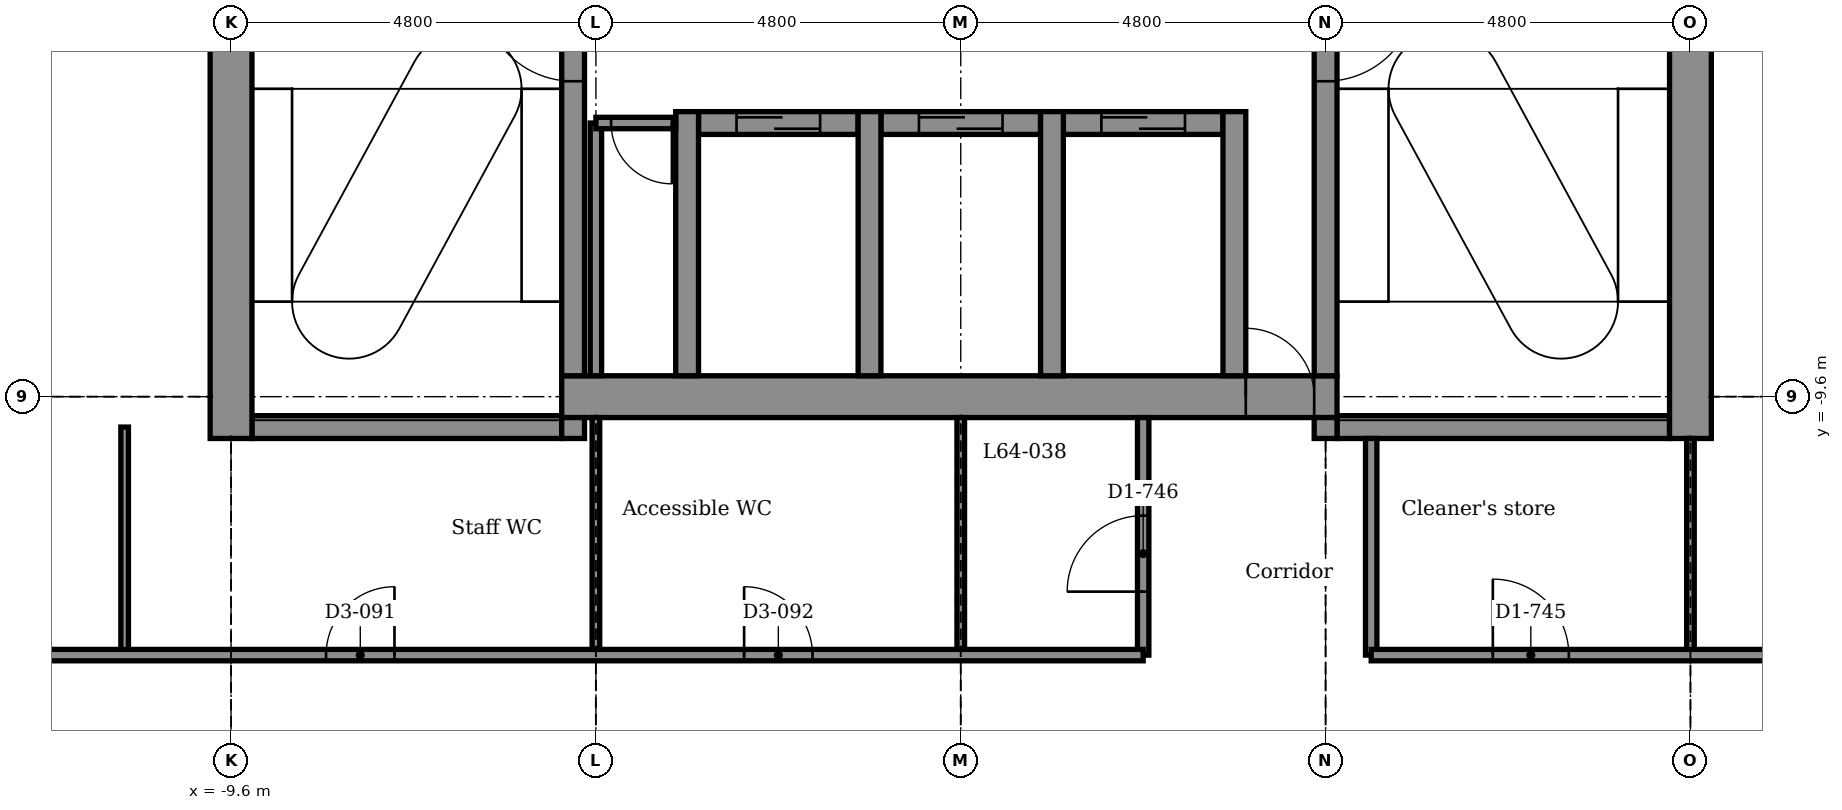
"""IFC4 building model, lengths in metres.
Left out: names, types, materials, properties, quantities, classifications, styles, units other than length and angle.
Written with IfcOpenShell. Run it as: python <this file> out.ifc"""

import sys

from ifc_helpers import new_model, si_unit, direction, frame, frame_2d, origin, place, context, subcontext, project, spatial, rectangle, extrude, element, fill, save


model = new_model("IFC4")
c1 = context("Model", 3, precision=1e-05, world=origin(), true_north=direction((0.0, 1.0)))
c2 = subcontext(c1, "Body", "Model", "MODEL_VIEW")
j1 = project(units=[si_unit("LENGTHUNIT", "METRE"), si_unit("PLANEANGLEUNIT", "RADIAN")], contexts=[c1])
p1 = place(None, origin())
s1 = spatial("IfcSite", under=j1, at=p1, CompositionType="ELEMENT")
p2 = place(p1, origin())
s2 = spatial("IfcBuilding", under=s1, at=p2, CompositionType="ELEMENT")
p3 = place(p2, frame((0.0, 0.0, 285.2)))
s3 = spatial("IfcBuildingStorey", under=s2, at=p3, CompositionType="ELEMENT", Elevation=285.2)
p4 = place(p3, frame((-9.325, -10.0, -0.15), z_axis=(0.0, 0.0, 1.0), x_axis=(1.0, 0.0, 0.0)))
e1 = element("IfcWall", 1, at=p4, inside=s3, PredefinedType="STANDARD", context=c2, shape_type="SweptSolid", body=[
    extrude(rectangle(XDim=4.075, YDim=0.3, at=frame_2d((2.038, 0.0))), origin(), (0.0, 0.0, 1.0), 3.9),
])
p5 = place(p3, frame((4.95, -10.0, -0.15), z_axis=(0.0, 0.0, 1.0), x_axis=(1.0, 0.0, 0.0)))
e2 = element("IfcWall", 2, at=p5, inside=s3, PredefinedType="STANDARD", context=c2, shape_type="SweptSolid", body=[
    extrude(rectangle(XDim=4.375, YDim=0.3, at=frame_2d((2.188, 0.0))), origin(), (0.0, 0.0, 1.0), 3.9),
])
p6 = place(p3, frame((-5.25, -9.6, -0.15), z_axis=(0.0, 0.0, 1.0), x_axis=(1.0, 0.0, 0.0)))
e3 = element("IfcWall", 3, at=p6, inside=s3, PredefinedType="SHEAR", context=c2, shape_type="SweptSolid", body=[
    extrude(rectangle(XDim=10.2, YDim=0.55, at=frame_2d((5.1, 0.0))), origin(), (0.0, 0.0, 1.0), 3.9),
])
p7 = place(p6, frame((9.0, 0.0, 0.15)))
e4 = element("IfcOpeningElement", 4, at=p7, cuts=e3, PredefinedType="OPENING", context=c2, shape_type="SweptSolid", body=[
    extrude(rectangle(XDim=0.9, YDim=2.1, at=frame_2d((0.45, 1.05))), frame((0.0, 0.285, 0.0), z_axis=(0.0, -1.0, 0.0), x_axis=(1.0, 0.0, 0.0)), (0.0, 0.0, 1.0), 0.57),
])
p8 = place(p3, frame((-3.45, -6.0, -0.15), z_axis=(0.0, 0.0, 1.0), x_axis=(1.0, 0.0, 0.0)))
e5 = element("IfcWall", 5, at=p8, inside=s3, PredefinedType="STANDARD", context=c2, shape_type="SweptSolid", body=[
    extrude(rectangle(XDim=2.1, YDim=0.3, at=frame_2d((1.05, 0.0))), origin(), (0.0, 0.0, 1.0), 3.9),
])
p9 = place(p8, frame((0.5, 0.0, 0.15)))
e6 = element("IfcOpeningElement", 6, at=p9, cuts=e5, PredefinedType="OPENING", context=c2, shape_type="SweptSolid", body=[
    extrude(rectangle(XDim=1.1, YDim=2.1, at=frame_2d((0.55, 1.05))), frame((0.0, 0.16, 0.0), z_axis=(0.0, -1.0, 0.0), x_axis=(1.0, 0.0, 0.0)), (0.0, 0.0, 1.0), 0.32),
])
p10 = place(p3, frame((-1.05, -6.0, -0.15), z_axis=(0.0, 0.0, 1.0), x_axis=(1.0, 0.0, 0.0)))
e7 = element("IfcWall", 7, at=p10, inside=s3, PredefinedType="STANDARD", context=c2, shape_type="SweptSolid", body=[
    extrude(rectangle(XDim=2.1, YDim=0.3, at=frame_2d((1.05, 0.0))), origin(), (0.0, 0.0, 1.0), 3.9),
])
p11 = place(p10, frame((0.5, 0.0, 0.15)))
e8 = element("IfcOpeningElement", 8, at=p11, cuts=e7, PredefinedType="OPENING", context=c2, shape_type="SweptSolid", body=[
    extrude(rectangle(XDim=1.1, YDim=2.1, at=frame_2d((0.55, 1.05))), frame((0.0, 0.16, 0.0), z_axis=(0.0, -1.0, 0.0), x_axis=(1.0, 0.0, 0.0)), (0.0, 0.0, 1.0), 0.32),
])
p12 = place(p3, frame((1.35, -6.0, -0.15), z_axis=(0.0, 0.0, 1.0), x_axis=(1.0, 0.0, 0.0)))
e9 = element("IfcWall", 9, at=p12, inside=s3, PredefinedType="STANDARD", context=c2, shape_type="SweptSolid", body=[
    extrude(rectangle(XDim=2.1, YDim=0.3, at=frame_2d((1.05, 0.0))), origin(), (0.0, 0.0, 1.0), 3.9),
])
p13 = place(p12, frame((0.5, 0.0, 0.15)))
e10 = element("IfcOpeningElement", 10, at=p13, cuts=e9, PredefinedType="OPENING", context=c2, shape_type="SweptSolid", body=[
    extrude(rectangle(XDim=1.1, YDim=2.1, at=frame_2d((0.55, 1.05))), frame((0.0, 0.16, 0.0), z_axis=(0.0, -1.0, 0.0), x_axis=(1.0, 0.0, 0.0)), (0.0, 0.0, 1.0), 0.32),
])
p14 = place(p3, frame((-9.6, -10.15, -0.15), z_axis=(0.0, 0.0, 1.0), x_axis=(0.0, 1.0, 0.0)))
e11 = element("IfcWall", 11, at=p14, inside=s3, PredefinedType="SHEAR", context=c2, shape_type="SweptSolid", body=[
    extrude(rectangle(XDim=7.6, YDim=0.55, at=frame_2d((3.8, 0.0))), origin(), (0.0, 0.0, 1.0), 3.9),
])
p15 = place(p3, frame((-5.1, -10.15, -0.15), z_axis=(0.0, 0.0, 1.0), x_axis=(0.0, 1.0, 0.0)))
e12 = element("IfcWall", 12, at=p15, inside=s3, PredefinedType="STANDARD", context=c2, shape_type="SweptSolid", body=[
    extrude(rectangle(XDim=0.275, YDim=0.3, at=frame_2d((0.137, 0.0))), origin(), (0.0, 0.0, 1.0), 3.9),
])
p16 = place(p3, frame((-5.1, -9.325, -0.15), z_axis=(0.0, 0.0, 1.0), x_axis=(0.0, 1.0, 0.0)))
e13 = element("IfcWall", 13, at=p16, inside=s3, PredefinedType="STANDARD", context=c2, shape_type="SweptSolid", body=[
    extrude(rectangle(XDim=7.075, YDim=0.3, at=frame_2d((3.538, 0.0))), origin(), (0.0, 0.0, 1.0), 3.9),
])
p17 = place(p16, frame((3.875, 0.0, 0.15)))
e14 = element("IfcOpeningElement", 14, at=p17, cuts=e13, PredefinedType="OPENING", context=c2, shape_type="SweptSolid", body=[
    extrude(rectangle(XDim=1.2, YDim=2.1, at=frame_2d((0.6, 1.05))), frame((0.0, 0.16, 0.0), z_axis=(0.0, -1.0, 0.0), x_axis=(1.0, 0.0, 0.0)), (0.0, 0.0, 1.0), 0.32),
])
for number, where, z_axis, x_axis in (
    (15, (-3.6, -9.325, -0.15), (0.0, 0.0, 1.0), (0.0, 1.0, 0.0)),
    (16, (-1.2, -9.325, -0.15), (0.0, 0.0, 1.0), (0.0, 1.0, 0.0)),
    (17, (1.2, -9.325, -0.15), (0.0, 0.0, 1.0), (0.0, 1.0, 0.0)),
    (18, (3.6, -9.325, -0.15), (0.0, 0.0, 1.0), (0.0, 1.0, 0.0)),
):
    element("IfcWall", number, at=place(p3, frame(where, z_axis=z_axis, x_axis=x_axis)), inside=s3, PredefinedType="STANDARD", context=c2, shape_type="SweptSolid", body=[
        extrude(rectangle(XDim=3.475, YDim=0.3, at=frame_2d((1.737, 0.0))), origin(), (0.0, 0.0, 1.0), 3.9),
    ])
p18 = place(p3, frame((4.8, -10.15, -0.15), z_axis=(0.0, 0.0, 1.0), x_axis=(0.0, 1.0, 0.0)))
e19 = element("IfcWall", 19, at=p18, inside=s3, PredefinedType="STANDARD", context=c2, shape_type="SweptSolid", body=[
    extrude(rectangle(XDim=0.275, YDim=0.3, at=frame_2d((0.137, 0.0))), origin(), (0.0, 0.0, 1.0), 3.9),
])
p19 = place(p3, frame((4.8, -9.325, -0.15), z_axis=(0.0, 0.0, 1.0), x_axis=(0.0, 1.0, 0.0)))
e20 = element("IfcWall", 20, at=p19, inside=s3, PredefinedType="STANDARD", context=c2, shape_type="SweptSolid", body=[
    extrude(rectangle(XDim=7.075, YDim=0.3, at=frame_2d((3.538, 0.0))), origin(), (0.0, 0.0, 1.0), 3.9),
])
p20 = place(p19, frame((3.875, 0.0, 0.15)))
e21 = element("IfcOpeningElement", 21, at=p20, cuts=e20, PredefinedType="OPENING", context=c2, shape_type="SweptSolid", body=[
    extrude(rectangle(XDim=1.2, YDim=2.1, at=frame_2d((0.6, 1.05))), frame((0.0, 0.16, 0.0), z_axis=(0.0, -1.0, 0.0), x_axis=(1.0, 0.0, 0.0)), (0.0, 0.0, 1.0), 0.32),
])
p21 = place(p3, frame((9.6, -10.15, -0.15), z_axis=(0.0, 0.0, 1.0), x_axis=(0.0, 1.0, 0.0)))
e22 = element("IfcWall", 22, at=p21, inside=s3, PredefinedType="SHEAR", context=c2, shape_type="SweptSolid", body=[
    extrude(rectangle(XDim=20.075, YDim=0.55, at=frame_2d((10.038, 0.0))), origin(), (0.0, 0.0, 1.0), 3.9),
])
p22 = place(p3, frame((9.6, -13.0, 0.0), z_axis=(0.0, 0.0, 1.0), x_axis=(0.0, 1.0, 0.0)))
e23 = element("IfcWall", 23, at=p22, inside=s3, PredefinedType="PARTITIONING", context=c2, shape_type="SweptSolid", body=[
    extrude(rectangle(XDim=2.85, YDim=0.1, at=frame_2d((1.425, 0.0))), origin(), (0.0, 0.0, 1.0), 3.293),
])
p23 = place(p3, frame((5.4, -13.0, 0.0), z_axis=(0.0, 0.0, 1.0), x_axis=(0.0, 1.0, 0.0)))
e24 = element("IfcWall", 24, at=p23, inside=s3, PredefinedType="PARTITIONING", context=c2, shape_type="SweptSolid", body=[
    extrude(rectangle(XDim=2.85, YDim=0.15, at=frame_2d((1.425, 0.0))), origin(), (0.0, 0.0, 1.0), 3.75),
])
p24 = place(p3, frame((2.4, -13.0, 0.0), z_axis=(0.0, 0.0, 1.0), x_axis=(0.0, 1.0, 0.0)))
e25 = element("IfcWall", 25, at=p24, inside=s3, PredefinedType="PARTITIONING", context=c2, shape_type="SweptSolid", body=[
    extrude(rectangle(XDim=3.125, YDim=0.15, at=frame_2d((1.562, 0.0))), origin(), (0.0, 0.0, 1.0), 3.75),
])
p25 = place(p24, frame((0.835, 0.0, 0.0)))
e26 = element("IfcOpeningElement", 26, at=p25, cuts=e25, PredefinedType="OPENING", context=c2, shape_type="SweptSolid", body=[
    extrude(rectangle(XDim=1.0, YDim=2.1, at=frame_2d((0.5, 1.05))), frame((0.0, 0.085, 0.0), z_axis=(0.0, -1.0, 0.0), x_axis=(1.0, 0.0, 0.0)), (0.0, 0.0, 1.0), 0.17),
])
for number, where, z_axis, x_axis in (
    (27, (0.0, -13.0, 0.0), (0.0, 0.0, 1.0), (0.0, 1.0, 0.0)),
    (28, (-4.8, -13.0, 0.0), (0.0, 0.0, 1.0), (0.0, 1.0, 0.0)),
):
    element("IfcWall", number, at=place(p3, frame(where, z_axis=z_axis, x_axis=x_axis)), inside=s3, PredefinedType="PARTITIONING", context=c2, shape_type="SweptSolid", body=[
        extrude(rectangle(XDim=3.125, YDim=0.1, at=frame_2d((1.562, 0.0))), origin(), (0.0, 0.0, 1.0), 3.217),
    ])
p26 = place(p3, frame((-4.8, -9.325, 0.0), z_axis=(0.0, 0.0, 1.0), x_axis=(0.0, 1.0, 0.0)))
e29 = element("IfcWall", 29, at=p26, inside=s3, PredefinedType="PARTITIONING", context=c2, shape_type="SweptSolid", body=[
    extrude(rectangle(XDim=3.325, YDim=0.15, at=frame_2d((1.663, 0.0))), origin(), (0.0, 0.0, 1.0), 3.75),
])
p27 = place(p3, frame((-11.0, -13.0, 0.0), z_axis=(0.0, 0.0, 1.0), x_axis=(0.0, 1.0, 0.0)))
e30 = element("IfcWall", 30, at=p27, inside=s3, PredefinedType="PARTITIONING", context=c2, shape_type="SweptSolid", body=[
    extrude(rectangle(XDim=3.0, YDim=0.1, at=frame_2d((1.5, 0.0))), origin(), (0.0, 0.0, 1.0), 3.75),
])
p28 = place(p3, frame((-14.624, -13.0, 0.0), z_axis=(0.0, 0.0, 1.0), x_axis=(1.0, 0.0, 0.0)))
e31 = element("IfcWall", 31, at=p28, inside=s3, PredefinedType="PARTITIONING", context=c2, shape_type="SweptSolid", body=[
    extrude(rectangle(XDim=17.024, YDim=0.15, at=frame_2d((8.512, 0.0))), origin(), (0.0, 0.0, 1.0), 3.75),
])
p29 = place(p28, frame((6.274, 0.0, 0.0)))
e32 = element("IfcOpeningElement", 32, at=p29, cuts=e31, PredefinedType="OPENING", context=c2, shape_type="SweptSolid", body=[
    extrude(rectangle(XDim=0.9, YDim=2.1, at=frame_2d((0.45, 1.05))), frame((0.0, 0.085, 0.0), z_axis=(0.0, -1.0, 0.0), x_axis=(1.0, 0.0, 0.0)), (0.0, 0.0, 1.0), 0.17),
])
p30 = place(p28, frame((11.774, 0.0, 0.0)))
e33 = element("IfcOpeningElement", 33, at=p30, cuts=e31, PredefinedType="OPENING", context=c2, shape_type="SweptSolid", body=[
    extrude(rectangle(XDim=0.9, YDim=2.1, at=frame_2d((0.45, 1.05))), frame((0.0, 0.085, 0.0), z_axis=(0.0, -1.0, 0.0), x_axis=(1.0, 0.0, 0.0)), (0.0, 0.0, 1.0), 0.17),
])
p31 = place(p3, frame((5.4, -13.0, 0.0), z_axis=(0.0, 0.0, 1.0), x_axis=(1.0, 0.0, 0.0)))
e34 = element("IfcWall", 34, at=p31, inside=s3, PredefinedType="PARTITIONING", context=c2, shape_type="SweptSolid", body=[
    extrude(rectangle(XDim=9.224, YDim=0.15, at=frame_2d((4.612, 0.0))), origin(), (0.0, 0.0, 1.0), 3.75),
])
p32 = place(p31, frame((1.6, 0.0, 0.0)))
e35 = element("IfcOpeningElement", 35, at=p32, cuts=e34, PredefinedType="OPENING", context=c2, shape_type="SweptSolid", body=[
    extrude(rectangle(XDim=1.0, YDim=2.1, at=frame_2d((0.5, 1.05))), frame((0.0, 0.085, 0.0), z_axis=(0.0, -1.0, 0.0), x_axis=(1.0, 0.0, 0.0)), (0.0, 0.0, 1.0), 0.17),
])
p33 = place(p31, frame((5.467, 0.0, 0.0)))
e36 = element("IfcOpeningElement", 36, at=p33, cuts=e34, PredefinedType="OPENING", context=c2, shape_type="SweptSolid", body=[
    extrude(rectangle(XDim=1.8, YDim=2.1, at=frame_2d((0.9, 1.05))), frame((0.0, 0.085, 0.0), z_axis=(0.0, -1.0, 0.0), x_axis=(1.0, 0.0, 0.0)), (0.0, 0.0, 1.0), 0.17),
])
p34 = place(p3, frame((-4.8, -6.0, 0.0), z_axis=(0.0, 0.0, 1.0), x_axis=(1.0, 0.0, 0.0)))
e37 = element("IfcWall", 37, at=p34, inside=s3, PredefinedType="PARTITIONING", context=c2, shape_type="SweptSolid", body=[
    extrude(rectangle(XDim=1.05, YDim=0.15, at=frame_2d((0.525, 0.0))), origin(), (0.0, 0.0, 1.0), 3.75),
])
p35 = place(p34, frame((0.2, 0.0, 0.0)))
e38 = element("IfcOpeningElement", 38, at=p35, cuts=e37, PredefinedType="OPENING", context=c2, shape_type="SweptSolid", body=[
    extrude(rectangle(XDim=0.8, YDim=2.1, at=frame_2d((0.4, 1.05))), frame((0.0, 0.085, 0.0), z_axis=(0.0, -1.0, 0.0), x_axis=(1.0, 0.0, 0.0)), (0.0, 0.0, 1.0), 0.17),
])
p36 = place(p35, frame((0.8, 0.0, 0.0), z_axis=(0.0, 0.0, 1.0), x_axis=(-1.0, 0.0, 0.0)))
e39 = element("IfcDoor", 39, at=p36, inside=s3, OperationType="SINGLE_SWING_RIGHT", PredefinedType="DOOR", context=c2, shape_type="SweptSolid", body=[
    extrude(rectangle(XDim=0.8, YDim=2.1, at=frame_2d((0.4, 1.05))), frame((0.0, 0.025, 0.0), z_axis=(0.0, -1.0, 0.0), x_axis=(1.0, 0.0, 0.0)), (0.0, 0.0, 1.0), 0.05),
])
fill(e38, e39)
p37 = place(p32, origin())
e40 = element("IfcDoor", 40, at=p37, inside=s3, OperationType="SINGLE_SWING_LEFT", PredefinedType="DOOR", context=c2, shape_type="SweptSolid", body=[
    extrude(rectangle(XDim=1.0, YDim=2.1, at=frame_2d((0.5, 1.05))), frame((0.0, 0.025, 0.0), z_axis=(0.0, -1.0, 0.0), x_axis=(1.0, 0.0, 0.0)), (0.0, 0.0, 1.0), 0.05),
])
fill(e35, e40)
p38 = place(p29, origin())
e41 = element("IfcDoor", 41, at=p38, inside=s3, OperationType="SINGLE_SWING_RIGHT", PredefinedType="DOOR", context=c2, shape_type="SweptSolid", body=[
    extrude(rectangle(XDim=0.9, YDim=2.1, at=frame_2d((0.45, 1.05))), frame((0.0, 0.025, 0.0), z_axis=(0.0, -1.0, 0.0), x_axis=(1.0, 0.0, 0.0)), (0.0, 0.0, 1.0), 0.05),
])
fill(e32, e41)
p39 = place(p30, origin())
e42 = element("IfcDoor", 42, at=p39, inside=s3, OperationType="SINGLE_SWING_LEFT", PredefinedType="DOOR", context=c2, shape_type="SweptSolid", body=[
    extrude(rectangle(XDim=0.9, YDim=2.1, at=frame_2d((0.45, 1.05))), frame((0.0, 0.025, 0.0), z_axis=(0.0, -1.0, 0.0), x_axis=(1.0, 0.0, 0.0)), (0.0, 0.0, 1.0), 0.05),
])
fill(e33, e42)
p40 = place(p25, origin())
e43 = element("IfcDoor", 43, at=p40, inside=s3, OperationType="SINGLE_SWING_LEFT", PredefinedType="DOOR", context=c2, shape_type="SweptSolid", body=[
    extrude(rectangle(XDim=1.0, YDim=2.1, at=frame_2d((0.5, 1.05))), frame((0.0, 0.025, 0.0), z_axis=(0.0, -1.0, 0.0), x_axis=(1.0, 0.0, 0.0)), (0.0, 0.0, 1.0), 0.05),
])
fill(e26, e43)
p41 = place(p9, origin())
e44 = element("IfcDoor", 44, at=p41, inside=s3, OperationType="DOUBLE_DOOR_SLIDING", PredefinedType="DOOR", context=c2, shape_type="SweptSolid", body=[
    extrude(rectangle(XDim=1.1, YDim=2.1, at=frame_2d((0.55, 1.05))), frame((0.0, 0.025, 0.0), z_axis=(0.0, -1.0, 0.0), x_axis=(1.0, 0.0, 0.0)), (0.0, 0.0, 1.0), 0.05),
])
fill(e6, e44)
p42 = place(p11, origin())
e45 = element("IfcDoor", 45, at=p42, inside=s3, OperationType="DOUBLE_DOOR_SLIDING", PredefinedType="DOOR", context=c2, shape_type="SweptSolid", body=[
    extrude(rectangle(XDim=1.1, YDim=2.1, at=frame_2d((0.55, 1.05))), frame((0.0, 0.025, 0.0), z_axis=(0.0, -1.0, 0.0), x_axis=(1.0, 0.0, 0.0)), (0.0, 0.0, 1.0), 0.05),
])
fill(e8, e45)
p43 = place(p13, origin())
e46 = element("IfcDoor", 46, at=p43, inside=s3, OperationType="DOUBLE_DOOR_SLIDING", PredefinedType="DOOR", context=c2, shape_type="SweptSolid", body=[
    extrude(rectangle(XDim=1.1, YDim=2.1, at=frame_2d((0.55, 1.05))), frame((0.0, 0.025, 0.0), z_axis=(0.0, -1.0, 0.0), x_axis=(1.0, 0.0, 0.0)), (0.0, 0.0, 1.0), 0.05),
])
fill(e10, e46)
p44 = place(p17, origin())
e47 = element("IfcDoor", 47, at=p44, inside=s3, OperationType="SINGLE_SWING_RIGHT", PredefinedType="DOOR", context=c2, shape_type="SweptSolid", body=[
    extrude(rectangle(XDim=1.2, YDim=2.1, at=frame_2d((0.6, 1.05))), frame((0.0, 0.025, 0.0), z_axis=(0.0, -1.0, 0.0), x_axis=(1.0, 0.0, 0.0)), (0.0, 0.0, 1.0), 0.05),
])
fill(e14, e47)
p45 = place(p20, frame((1.2, 0.0, 0.0), z_axis=(0.0, 0.0, 1.0), x_axis=(-1.0, 0.0, 0.0)))
e48 = element("IfcDoor", 48, at=p45, inside=s3, OperationType="SINGLE_SWING_RIGHT", PredefinedType="DOOR", context=c2, shape_type="SweptSolid", body=[
    extrude(rectangle(XDim=1.2, YDim=2.1, at=frame_2d((0.6, 1.05))), frame((0.0, 0.025, 0.0), z_axis=(0.0, -1.0, 0.0), x_axis=(1.0, 0.0, 0.0)), (0.0, 0.0, 1.0), 0.05),
])
fill(e21, e48)
p46 = place(p7, origin())
e49 = element("IfcDoor", 49, at=p46, inside=s3, OperationType="SINGLE_SWING_LEFT", PredefinedType="DOOR", context=c2, shape_type="SweptSolid", body=[
    extrude(rectangle(XDim=0.9, YDim=2.1, at=frame_2d((0.45, 1.05))), frame((0.0, 0.025, 0.0), z_axis=(0.0, -1.0, 0.0), x_axis=(1.0, 0.0, 0.0)), (0.0, 0.0, 1.0), 0.05),
])
fill(e4, e49)
save(model, sys.argv[1])
